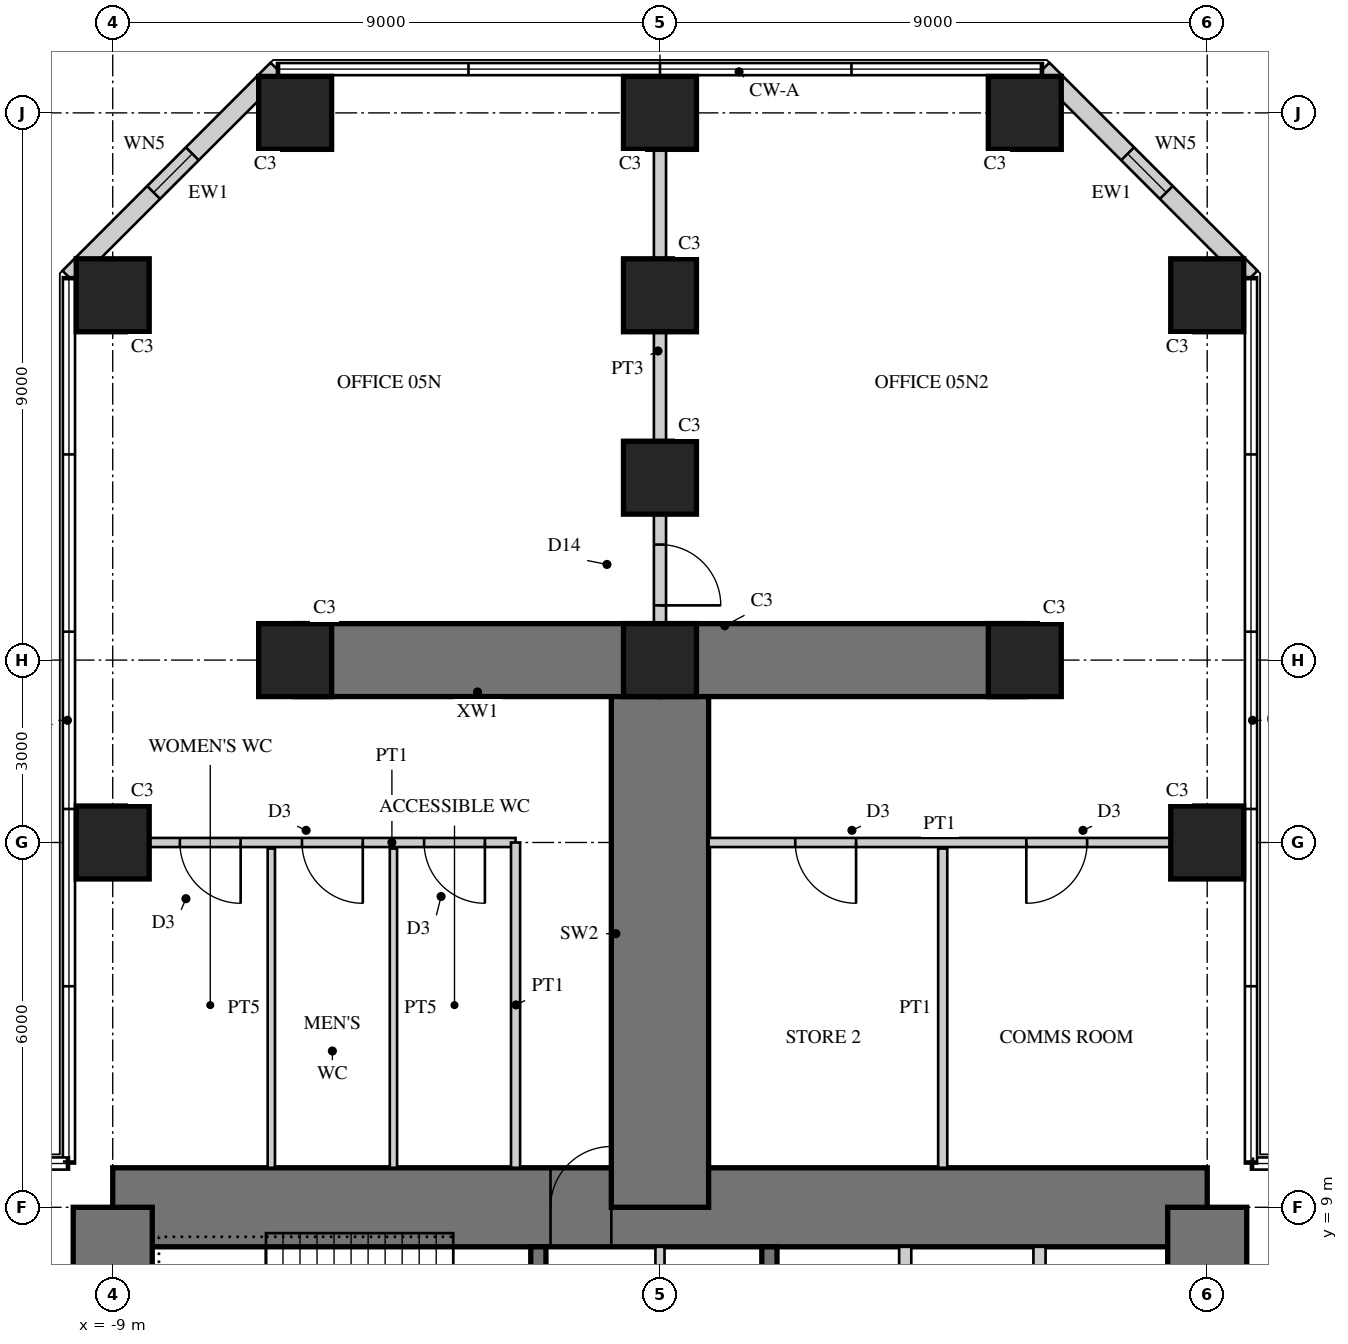
"""IFC4 building model, lengths in metres.
Left out: names, types, materials, properties, quantities, classifications, styles, units other than length and angle.
Written with IfcOpenShell. Run it as: python <this file> out.ifc"""

import sys

from ifc_helpers import new_model, si_unit, direction, frame, frame_2d, origin, origin_2d, place, context, subcontext, project, spatial, rectangle, hollow_rectangle, extrude, element, fill, save


model = new_model("IFC4")
c1 = context("Model", 3, precision=1e-05, world=origin(), true_north=direction((0.0, 1.0)))
c2 = subcontext(c1, "Body", "Model", "MODEL_VIEW")
j1 = project(units=[si_unit("LENGTHUNIT", "METRE"), si_unit("PLANEANGLEUNIT", "RADIAN")], contexts=[c1])
p1 = place(None, origin())
s1 = spatial("IfcSite", under=j1, at=p1, CompositionType="ELEMENT")
p2 = place(p1, origin())
s2 = spatial("IfcBuilding", under=s1, at=p2, CompositionType="ELEMENT")
p3 = place(p2, frame((0.0, 0.0, 23.5)))
s3 = spatial("IfcBuildingStorey", under=s2, at=p3, CompositionType="ELEMENT", Elevation=23.5)
p4 = place(p3, frame((9.0, 9.0, 0.0), z_axis=(0.0, 0.0, 1.0), x_axis=(-1.0, 0.0, 0.0)))
e1 = element("IfcWall", 1, at=p4, inside=s3, PredefinedType="SHEAR", context=c2, shape_type="SweptSolid", body=[
    extrude(rectangle(XDim=18.0, YDim=1.3, at=frame_2d((9.0, 0.0))), origin(), (0.0, 0.0, 1.0), 4.0),
])
p5 = place(p4, frame((9.8, 0.0, 0.0)))
e2 = element("IfcOpeningElement", 2, at=p5, cuts=e1, PredefinedType="OPENING", context=c2, shape_type="SweptSolid", body=[
    extrude(rectangle(XDim=1.0, YDim=2.4, at=frame_2d((0.5, 1.2))), frame((0.0, 0.66, 0.0), z_axis=(0.0, -1.0, 0.0), x_axis=(1.0, 0.0, 0.0)), (0.0, 0.0, 1.0), 1.32),
])
p6 = place(p3, frame((9.0, -9.0, 0.0), z_axis=(0.0, 0.0, 1.0), x_axis=(0.0, 1.0, 0.0)))
e3 = element("IfcWall", 3, at=p6, inside=s3, PredefinedType="SHEAR", context=c2, shape_type="SweptSolid", body=[
    extrude(rectangle(XDim=18.0, YDim=1.3, at=frame_2d((9.0, 0.0))), origin(), (0.0, 0.0, 1.0), 4.0),
])
p7 = place(p6, frame((9.8, 0.0, 0.0)))
e4 = element("IfcOpeningElement", 4, at=p7, cuts=e3, PredefinedType="OPENING", context=c2, shape_type="SweptSolid", body=[
    extrude(rectangle(XDim=1.0, YDim=2.4, at=frame_2d((0.5, 1.2))), frame((0.0, 0.66, 0.0), z_axis=(0.0, -1.0, 0.0), x_axis=(1.0, 0.0, 0.0)), (0.0, 0.0, 1.0), 1.32),
])
p8 = place(p3, frame((-9.0, 9.0, 0.0), z_axis=(0.0, 0.0, 1.0), x_axis=(0.0, -1.0, 0.0)))
e5 = element("IfcWall", 5, at=p8, inside=s3, PredefinedType="SHEAR", context=c2, shape_type="SweptSolid", body=[
    extrude(rectangle(XDim=18.0, YDim=1.3, at=frame_2d((9.0, 0.0))), origin(), (0.0, 0.0, 1.0), 4.0),
])
p9 = place(p8, frame((9.8, 0.0, 0.0)))
e6 = element("IfcOpeningElement", 6, at=p9, cuts=e5, PredefinedType="OPENING", context=c2, shape_type="SweptSolid", body=[
    extrude(rectangle(XDim=1.0, YDim=2.4, at=frame_2d((0.5, 1.2))), frame((0.0, 0.66, 0.0), z_axis=(0.0, -1.0, 0.0), x_axis=(1.0, 0.0, 0.0)), (0.0, 0.0, 1.0), 1.32),
])
p10 = place(p3, frame((1.8, 1.875, 0.0), z_axis=(0.0, 0.0, 1.0), x_axis=(0.0, 1.0, 0.0)))
e7 = element("IfcWall", 7, at=p10, inside=s3, PredefinedType="SHEAR", context=c2, shape_type="SweptSolid", body=[
    extrude(rectangle(XDim=6.475, YDim=0.25, at=frame_2d((3.238, 0.0))), origin(), (0.0, 0.0, 1.0), 4.0),
])
p11 = place(p10, frame((1.875, 0.0, 0.0)))
e8 = element("IfcOpeningElement", 8, at=p11, cuts=e7, PredefinedType="OPENING", context=c2, shape_type="SweptSolid", body=[
    extrude(rectangle(XDim=1.6, YDim=2.4, at=frame_2d((0.8, 1.2))), frame((0.0, 0.135, 0.0), z_axis=(0.0, -1.0, 0.0), x_axis=(1.0, 0.0, 0.0)), (0.0, 0.0, 1.0), 0.27),
])
for number, where, z_axis, x_axis in (
    (9, (4.033, 5.975, 0.0), (0.0, 0.0, 1.0), (0.0, 1.0, 0.0)),
    (10, (6.242, 5.975, 0.0), (0.0, 0.0, 1.0), (0.0, 1.0, 0.0)),
):
    element("IfcWall", number, at=place(p3, frame(where, z_axis=z_axis, x_axis=x_axis)), inside=s3, PredefinedType="PARTITIONING", context=c2, shape_type="SweptSolid", body=[
        extrude(rectangle(XDim=2.375, YDim=0.2, at=frame_2d((1.188, 0.0))), origin(), (0.0, 0.0, 1.0), 4.0),
    ])
p12 = place(p3, frame((-2.0, 1.675, 0.0), z_axis=(0.0, 0.0, 1.0), x_axis=(0.0, 1.0, 0.0)))
e11 = element("IfcWall", 11, at=p12, inside=s3, PredefinedType="SHEAR", context=c2, shape_type="SweptSolid", body=[
    extrude(rectangle(XDim=6.675, YDim=0.25, at=frame_2d((3.337, 0.0))), origin(), (0.0, 0.0, 1.0), 4.0),
])
p13 = place(p12, frame((0.725, 0.0, 0.0)))
e12 = element("IfcOpeningElement", 12, at=p13, cuts=e11, PredefinedType="OPENING", context=c2, shape_type="SweptSolid", body=[
    extrude(rectangle(XDim=1.0, YDim=2.1, at=frame_2d((0.5, 1.05))), frame((0.0, 0.135, 0.0), z_axis=(0.0, -1.0, 0.0), x_axis=(1.0, 0.0, 0.0)), (0.0, 0.0, 1.0), 0.27),
])
p14 = place(p3, frame((0.0, 9.0, 0.0), z_axis=(0.0, 0.0, 1.0), x_axis=(0.0, 1.0, 0.0)))
e13 = element("IfcWall", 13, at=p14, inside=s3, PredefinedType="SHEAR", context=c2, shape_type="SweptSolid", body=[
    extrude(rectangle(XDim=9.0, YDim=1.6, at=frame_2d((4.5, 0.0))), origin(), (0.0, 0.0, 1.0), 4.0),
])
for number, where, z_axis, x_axis in (
    (14, (0.0, 18.0, 0.0), (0.0, 0.0, 1.0), (-1.0, 0.0, 0.0)),
    (15, (0.0, 18.0, 0.0), (0.0, 0.0, 1.0), (1.0, 0.0, 0.0)),
):
    element("IfcWall", number, at=place(p3, frame(where, z_axis=z_axis, x_axis=x_axis)), inside=s3, PredefinedType="SHEAR", context=c2, shape_type="SweptSolid", body=[
        extrude(rectangle(XDim=6.0, YDim=1.2, at=frame_2d((3.0, 0.0))), origin(), (0.0, 0.0, 1.0), 4.0),
    ])
for number, where, z_axis, x_axis in (
    (16, (9.0, 15.0, 0.0), (0.0, 0.0, 1.0), (1.0, 0.0, 0.0)),
    (17, (9.0, 24.0, 0.0), (0.0, 0.0, 1.0), (1.0, 0.0, 0.0)),
    (18, (-9.0, 15.0, 0.0), (0.0, 0.0, 1.0), (1.0, 0.0, 0.0)),
    (19, (-9.0, 24.0, 0.0), (0.0, 0.0, 1.0), (1.0, 0.0, 0.0)),
    (20, (6.0, 27.0, 0.0), (0.0, 0.0, 1.0), (1.0, 0.0, 0.0)),
    (21, (0.0, 27.0, 0.0), (0.0, 0.0, 1.0), (1.0, 0.0, 0.0)),
    (22, (-6.0, 27.0, 0.0), (0.0, 0.0, 1.0), (1.0, 0.0, 0.0)),
    (23, (6.0, 18.0, 0.0), (0.0, 0.0, 1.0), (1.0, 0.0, 0.0)),
    (24, (0.0, 18.0, 0.0), (0.0, 0.0, 1.0), (1.0, 0.0, 0.0)),
    (25, (-6.0, 18.0, 0.0), (0.0, 0.0, 1.0), (1.0, 0.0, 0.0)),
    (26, (0.0, 21.0, 0.0), (0.0, 0.0, 1.0), (1.0, 0.0, 0.0)),
    (27, (0.0, 24.0, 0.0), (0.0, 0.0, 1.0), (1.0, 0.0, 0.0)),
):
    element("IfcColumn", number, at=place(p3, frame(where, z_axis=z_axis, x_axis=x_axis)), inside=s3, PredefinedType="COLUMN", context=c2, shape_type="SweptSolid", body=[
        extrude(rectangle(XDim=1.2, YDim=1.2, at=origin_2d()), origin(), (0.0, 0.0, 1.0), 4.0),
    ])
p15 = place(p3, frame((9.72, 24.298, 0.0), z_axis=(0.0, 0.0, 1.0), x_axis=(-0.707106781187, 0.707106781187, 0.0)))
e28 = element("IfcWall", 28, at=p15, inside=s3, PredefinedType="SOLIDWALL", context=c2, shape_type="SweptSolid", body=[
    extrude(rectangle(XDim=4.839, YDim=0.3, at=frame_2d((2.419, 0.0))), origin(), (0.0, 0.0, 1.0), 3.8),
])
p16 = place(p15, frame((1.969, 0.0, 0.3)))
e29 = element("IfcOpeningElement", 29, at=p16, cuts=e28, PredefinedType="OPENING", context=c2, shape_type="SweptSolid", body=[
    extrude(rectangle(XDim=0.9, YDim=2.4, at=frame_2d((0.45, 1.2))), frame((0.0, 0.16, 0.0), z_axis=(0.0, -1.0, 0.0), x_axis=(1.0, 0.0, 0.0)), (0.0, 0.0, 1.0), 0.32),
])
p17 = place(p3, frame((-6.298, 27.72, 0.0), z_axis=(0.0, 0.0, 1.0), x_axis=(-0.707106781187, -0.707106781187, 0.0)))
e30 = element("IfcWall", 30, at=p17, inside=s3, PredefinedType="SOLIDWALL", context=c2, shape_type="SweptSolid", body=[
    extrude(rectangle(XDim=4.839, YDim=0.3, at=frame_2d((2.419, 0.0))), origin(), (0.0, 0.0, 1.0), 3.8),
])
p18 = place(p17, frame((1.969, 0.0, 0.3)))
e31 = element("IfcOpeningElement", 31, at=p18, cuts=e30, PredefinedType="OPENING", context=c2, shape_type="SweptSolid", body=[
    extrude(rectangle(XDim=0.9, YDim=2.4, at=frame_2d((0.45, 1.2))), frame((0.0, 0.16, 0.0), z_axis=(0.0, -1.0, 0.0), x_axis=(1.0, 0.0, 0.0)), (0.0, 0.0, 1.0), 0.32),
])
p19 = place(p3, frame((0.0, 5.675, 0.0), z_axis=(0.0, 0.0, 1.0), x_axis=(0.0, 1.0, 0.0)))
e32 = element("IfcWall", 32, at=p19, inside=s3, PredefinedType="PARTITIONING", context=c2, shape_type="SweptSolid", body=[
    extrude(rectangle(XDim=2.675, YDim=0.15, at=frame_2d((1.337, 0.0))), origin(), (0.0, 0.0, 1.0), 3.8),
])
p20 = place(p19, frame((0.4, 0.0, 0.0)))
e33 = element("IfcOpeningElement", 33, at=p20, cuts=e32, PredefinedType="OPENING", context=c2, shape_type="SweptSolid", body=[
    extrude(rectangle(XDim=1.0, YDim=2.1, at=frame_2d((0.5, 1.05))), frame((0.0, 0.085, 0.0), z_axis=(0.0, -1.0, 0.0), x_axis=(1.0, 0.0, 0.0)), (0.0, 0.0, 1.0), 0.17),
])
p21 = place(p3, frame((-2.375, 15.0, 0.0), z_axis=(0.0, 0.0, 1.0), x_axis=(-1.0, 0.0, 0.0)))
e34 = element("IfcWall", 34, at=p21, inside=s3, PredefinedType="PARTITIONING", context=c2, shape_type="SweptSolid", body=[
    extrude(rectangle(XDim=6.025, YDim=0.15, at=frame_2d((3.012, 0.0))), origin(), (0.0, 0.0, 1.0), 2.95),
])
p22 = place(p21, frame((0.504, 0.0, 0.0)))
e35 = element("IfcOpeningElement", 35, at=p22, cuts=e34, PredefinedType="OPENING", context=c2, shape_type="SweptSolid", body=[
    extrude(rectangle(XDim=1.0, YDim=2.1, at=frame_2d((0.5, 1.05))), frame((0.0, 0.085, 0.0), z_axis=(0.0, -1.0, 0.0), x_axis=(1.0, 0.0, 0.0)), (0.0, 0.0, 1.0), 0.17),
])
p23 = place(p21, frame((2.512, 0.0, 0.0)))
e36 = element("IfcOpeningElement", 36, at=p23, cuts=e34, PredefinedType="OPENING", context=c2, shape_type="SweptSolid", body=[
    extrude(rectangle(XDim=1.0, YDim=2.1, at=frame_2d((0.5, 1.05))), frame((0.0, 0.085, 0.0), z_axis=(0.0, -1.0, 0.0), x_axis=(1.0, 0.0, 0.0)), (0.0, 0.0, 1.0), 0.17),
])
p24 = place(p21, frame((4.521, 0.0, 0.0)))
e37 = element("IfcOpeningElement", 37, at=p24, cuts=e34, PredefinedType="OPENING", context=c2, shape_type="SweptSolid", body=[
    extrude(rectangle(XDim=1.0, YDim=2.1, at=frame_2d((0.5, 1.05))), frame((0.0, 0.085, 0.0), z_axis=(0.0, -1.0, 0.0), x_axis=(1.0, 0.0, 0.0)), (0.0, 0.0, 1.0), 0.17),
])
p25 = place(p3, frame((-2.375, 9.65, 0.0), z_axis=(0.0, 0.0, 1.0), x_axis=(0.0, 1.0, 0.0)))
e38 = element("IfcWall", 38, at=p25, inside=s3, PredefinedType="PARTITIONING", context=c2, shape_type="SweptSolid", body=[
    extrude(rectangle(XDim=5.35, YDim=0.15, at=frame_2d((2.675, 0.0))), origin(), (0.0, 0.0, 1.0), 3.8),
])
for number, where, z_axis, x_axis in (
    (39, (-4.383, 9.65, 0.0), (0.0, 0.0, 1.0), (0.0, 1.0, 0.0)),
    (40, (-6.392, 9.65, 0.0), (0.0, 0.0, 1.0), (0.0, 1.0, 0.0)),
):
    element("IfcWall", number, at=place(p3, frame(where, z_axis=z_axis, x_axis=x_axis)), inside=s3, PredefinedType="PLUMBINGWALL", context=c2, shape_type="SweptSolid", body=[
        extrude(rectangle(XDim=5.25, YDim=0.12, at=frame_2d((2.625, 0.0))), origin(), (0.0, 0.0, 1.0), 3.8),
    ])
p26 = place(p3, frame((8.4, 15.0, 0.0), z_axis=(0.0, 0.0, 1.0), x_axis=(-1.0, 0.0, 0.0)))
e41 = element("IfcWall", 41, at=p26, inside=s3, PredefinedType="PARTITIONING", context=c2, shape_type="SweptSolid", body=[
    extrude(rectangle(XDim=7.6, YDim=0.15, at=frame_2d((3.8, 0.0))), origin(), (0.0, 0.0, 1.0), 2.95),
])
p27 = place(p26, frame((1.375, 0.0, 0.0)))
e42 = element("IfcOpeningElement", 42, at=p27, cuts=e41, PredefinedType="OPENING", context=c2, shape_type="SweptSolid", body=[
    extrude(rectangle(XDim=1.0, YDim=2.1, at=frame_2d((0.5, 1.05))), frame((0.0, 0.085, 0.0), z_axis=(0.0, -1.0, 0.0), x_axis=(1.0, 0.0, 0.0)), (0.0, 0.0, 1.0), 0.17),
])
p28 = place(p26, frame((5.175, 0.0, 0.0)))
e43 = element("IfcOpeningElement", 43, at=p28, cuts=e41, PredefinedType="OPENING", context=c2, shape_type="SweptSolid", body=[
    extrude(rectangle(XDim=1.0, YDim=2.1, at=frame_2d((0.5, 1.05))), frame((0.0, 0.085, 0.0), z_axis=(0.0, -1.0, 0.0), x_axis=(1.0, 0.0, 0.0)), (0.0, 0.0, 1.0), 0.17),
])
p29 = place(p3, frame((4.65, 9.65, 0.0), z_axis=(0.0, 0.0, 1.0), x_axis=(0.0, 1.0, 0.0)))
e44 = element("IfcWall", 44, at=p29, inside=s3, PredefinedType="PARTITIONING", context=c2, shape_type="SweptSolid", body=[
    extrude(rectangle(XDim=5.25, YDim=0.15, at=frame_2d((2.625, 0.0))), origin(), (0.0, 0.0, 1.0), 3.8),
])
p30 = place(p3, frame((0.0, 18.0, 0.0), z_axis=(0.0, 0.0, 1.0), x_axis=(0.0, 1.0, 0.0)))
e45 = element("IfcWall", 45, at=p30, inside=s3, PredefinedType="SOLIDWALL", context=c2, shape_type="SweptSolid", body=[
    extrude(rectangle(XDim=3.0, YDim=0.2, at=frame_2d((1.5, 0.0))), origin(), (0.0, 0.0, 1.0), 3.8),
])
p31 = place(p30, frame((0.9, 0.0, 0.0)))
e46 = element("IfcOpeningElement", 46, at=p31, cuts=e45, PredefinedType="OPENING", context=c2, shape_type="SweptSolid", body=[
    extrude(rectangle(XDim=1.0, YDim=2.2, at=frame_2d((0.5, 1.1))), frame((0.0, 0.11, 0.0), z_axis=(0.0, -1.0, 0.0), x_axis=(1.0, 0.0, 0.0)), (0.0, 0.0, 1.0), 0.22),
])
p32 = place(p3, frame((0.0, 21.0, 0.0), z_axis=(0.0, 0.0, 1.0), x_axis=(0.0, 1.0, 0.0)))
e47 = element("IfcWall", 47, at=p32, inside=s3, PredefinedType="SOLIDWALL", context=c2, shape_type="SweptSolid", body=[
    extrude(rectangle(XDim=6.0, YDim=0.2, at=frame_2d((3.0, 0.0))), origin(), (0.0, 0.0, 1.0), 2.9),
])
p33 = place(p16, origin())
e48 = element("IfcWindow", 48, at=p33, inside=s3, PartitioningType="SINGLE_PANEL", PredefinedType="WINDOW", context=c2, shape_type="SweptSolid", body=[
    extrude(hollow_rectangle(XDim=0.9, YDim=2.4, WallThickness=0.06, at=frame_2d((0.45, 1.2))), frame((0.0, 0.03, 0.0), z_axis=(0.0, -1.0, 0.0), x_axis=(1.0, 0.0, 0.0)), (0.0, 0.0, 1.0), 0.06),
    extrude(rectangle(XDim=0.779, YDim=2.279, at=frame_2d((0.45, 1.2))), frame((0.0, 0.03, 0.0), z_axis=(0.0, -1.0, 0.0), x_axis=(1.0, 0.0, 0.0)), (0.0, 0.0, 1.0), 0.06),
])
fill(e29, e48)
p34 = place(p18, origin())
e49 = element("IfcWindow", 49, at=p34, inside=s3, PartitioningType="SINGLE_PANEL", PredefinedType="WINDOW", context=c2, shape_type="SweptSolid", body=[
    extrude(hollow_rectangle(XDim=0.9, YDim=2.4, WallThickness=0.06, at=frame_2d((0.45, 1.2))), frame((0.0, 0.03, 0.0), z_axis=(0.0, -1.0, 0.0), x_axis=(1.0, 0.0, 0.0)), (0.0, 0.0, 1.0), 0.06),
    extrude(rectangle(XDim=0.779, YDim=2.279, at=frame_2d((0.45, 1.2))), frame((0.0, 0.03, 0.0), z_axis=(0.0, -1.0, 0.0), x_axis=(1.0, 0.0, 0.0)), (0.0, 0.0, 1.0), 0.06),
])
fill(e31, e49)
p35 = place(p22, origin())
e50 = element("IfcDoor", 50, at=p35, inside=s3, OperationType="SINGLE_SWING_LEFT", PredefinedType="DOOR", context=c2, shape_type="SweptSolid", body=[
    extrude(rectangle(XDim=1.0, YDim=2.1, at=frame_2d((0.5, 1.05))), frame((0.0, 0.025, 0.0), z_axis=(0.0, -1.0, 0.0), x_axis=(1.0, 0.0, 0.0)), (0.0, 0.0, 1.0), 0.05),
])
fill(e35, e50)
p36 = place(p23, origin())
e51 = element("IfcDoor", 51, at=p36, inside=s3, OperationType="SINGLE_SWING_LEFT", PredefinedType="DOOR", context=c2, shape_type="SweptSolid", body=[
    extrude(rectangle(XDim=1.0, YDim=2.1, at=frame_2d((0.5, 1.05))), frame((0.0, 0.025, 0.0), z_axis=(0.0, -1.0, 0.0), x_axis=(1.0, 0.0, 0.0)), (0.0, 0.0, 1.0), 0.05),
])
fill(e36, e51)
p37 = place(p24, origin())
e52 = element("IfcDoor", 52, at=p37, inside=s3, OperationType="SINGLE_SWING_LEFT", PredefinedType="DOOR", context=c2, shape_type="SweptSolid", body=[
    extrude(rectangle(XDim=1.0, YDim=2.1, at=frame_2d((0.5, 1.05))), frame((0.0, 0.025, 0.0), z_axis=(0.0, -1.0, 0.0), x_axis=(1.0, 0.0, 0.0)), (0.0, 0.0, 1.0), 0.05),
])
fill(e37, e52)
p38 = place(p27, origin())
e53 = element("IfcDoor", 53, at=p38, inside=s3, OperationType="SINGLE_SWING_RIGHT", PredefinedType="DOOR", context=c2, shape_type="SweptSolid", body=[
    extrude(rectangle(XDim=1.0, YDim=2.1, at=frame_2d((0.5, 1.05))), frame((0.0, 0.025, 0.0), z_axis=(0.0, -1.0, 0.0), x_axis=(1.0, 0.0, 0.0)), (0.0, 0.0, 1.0), 0.05),
])
fill(e42, e53)
p39 = place(p28, origin())
e54 = element("IfcDoor", 54, at=p39, inside=s3, OperationType="SINGLE_SWING_LEFT", PredefinedType="DOOR", context=c2, shape_type="SweptSolid", body=[
    extrude(rectangle(XDim=1.0, YDim=2.1, at=frame_2d((0.5, 1.05))), frame((0.0, 0.025, 0.0), z_axis=(0.0, -1.0, 0.0), x_axis=(1.0, 0.0, 0.0)), (0.0, 0.0, 1.0), 0.05),
])
fill(e43, e54)
p40 = place(p31, frame((1.0, 0.0, 0.0), z_axis=(0.0, 0.0, 1.0), x_axis=(-1.0, 0.0, 0.0)))
e55 = element("IfcDoor", 55, at=p40, inside=s3, OperationType="SINGLE_SWING_RIGHT", PredefinedType="DOOR", context=c2, shape_type="SweptSolid", body=[
    extrude(rectangle(XDim=1.0, YDim=2.2, at=frame_2d((0.5, 1.1))), frame((0.0, 0.025, 0.0), z_axis=(0.0, -1.0, 0.0), x_axis=(1.0, 0.0, 0.0)), (0.0, 0.0, 1.0), 0.05),
])
fill(e46, e55)
p41 = place(p5, frame((1.0, 0.0, 0.0), z_axis=(0.0, 0.0, 1.0), x_axis=(-1.0, 0.0, 0.0)))
e56 = element("IfcDoor", 56, at=p41, inside=s3, OperationType="SINGLE_SWING_RIGHT", PredefinedType="DOOR", context=c2, shape_type="SweptSolid", body=[
    extrude(rectangle(XDim=1.0, YDim=2.4, at=frame_2d((0.5, 1.2))), frame((0.0, -0.005, 0.0), z_axis=(0.0, -1.0, 0.0), x_axis=(1.0, 0.0, 0.0)), (0.0, 0.0, 1.0), 0.05),
])
fill(e2, e56)
save(model, sys.argv[1])
